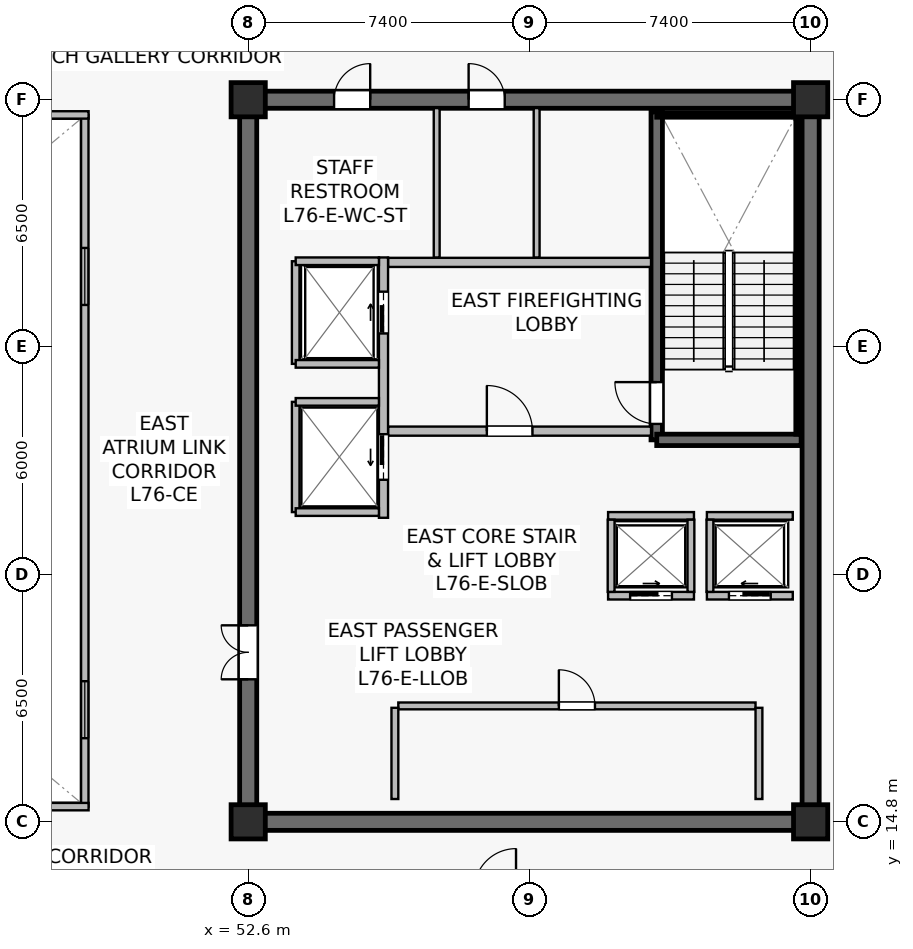
"""IFC4 building model, lengths in metres.
Left out: names, types, materials, properties, quantities, classifications, styles, units other than length and angle.
Written with IfcOpenShell. Run it as: python <this file> out.ifc"""

import sys

from ifc_helpers import new_model, si_unit, direction, frame, frame_2d, origin, origin_2d, place, context, subcontext, project, spatial, rectangle, extrude, source, transform, mapped, element, fill, save


model = new_model("IFC4")
c1 = context("Model", 3, precision=1e-05, world=origin(), true_north=direction((0.0, 1.0)))
c2 = subcontext(c1, "Body", "Model", "MODEL_VIEW")
j1 = project(units=[si_unit("LENGTHUNIT", "METRE"), si_unit("PLANEANGLEUNIT", "RADIAN")], contexts=[c1])
p1 = place(None, origin())
s1 = spatial("IfcSite", under=j1, at=p1, CompositionType="ELEMENT")
p2 = place(p1, origin())
s2 = spatial("IfcBuilding", under=s1, at=p2, CompositionType="ELEMENT")
p3 = place(p2, frame((0.0, 0.0, 318.6)))
s3 = spatial("IfcBuildingStorey", under=s2, at=p3, CompositionType="ELEMENT", Elevation=318.6)
p4 = place(p3, frame((52.375, 14.8, 0.0), z_axis=(0.0, 0.0, 1.0), x_axis=(1.0, 0.0, 0.0)))
e1 = element("IfcWall", 1, at=p4, inside=s3, PredefinedType="SHEAR", context=c2, shape_type="SweptSolid", body=[
    extrude(rectangle(XDim=15.25, YDim=0.45, at=frame_2d((7.625, 0.0))), origin(), (0.0, 0.0, 1.0), 3.9),
])
p5 = place(p3, frame((52.375, 33.8, 0.0), z_axis=(0.0, 0.0, 1.0), x_axis=(1.0, 0.0, 0.0)))
e2 = element("IfcWall", 2, at=p5, inside=s3, PredefinedType="SHEAR", context=c2, shape_type="SweptSolid", body=[
    extrude(rectangle(XDim=15.25, YDim=0.45, at=frame_2d((7.625, 0.0))), origin(), (0.0, 0.0, 1.0), 3.9),
])
p6 = place(p5, frame((6.025, 0.0, 0.0)))
e3 = element("IfcOpeningElement", 3, at=p6, cuts=e2, PredefinedType="OPENING", context=c2, shape_type="SweptSolid", body=[
    extrude(rectangle(XDim=0.95, YDim=2.15, at=frame_2d((0.475, 1.075))), frame((0.0, 0.235, 0.0), z_axis=(0.0, -1.0, 0.0), x_axis=(1.0, 0.0, 0.0)), (0.0, 0.0, 1.0), 0.47),
])
p7 = place(p5, frame((2.485, 0.0, 0.0)))
e4 = element("IfcOpeningElement", 4, at=p7, cuts=e2, PredefinedType="OPENING", context=c2, shape_type="SweptSolid", body=[
    extrude(rectangle(XDim=0.95, YDim=2.15, at=frame_2d((0.475, 1.075))), frame((0.0, 0.235, 0.0), z_axis=(0.0, -1.0, 0.0), x_axis=(1.0, 0.0, 0.0)), (0.0, 0.0, 1.0), 0.47),
])
p8 = place(p3, frame((52.6, 15.025, 0.0), z_axis=(0.0, 0.0, 1.0), x_axis=(0.0, 1.0, 0.0)))
e5 = element("IfcWall", 5, at=p8, inside=s3, PredefinedType="SHEAR", context=c2, shape_type="SweptSolid", body=[
    extrude(rectangle(XDim=18.55, YDim=0.45, at=frame_2d((9.275, 0.0))), origin(), (0.0, 0.0, 1.0), 3.9),
])
p9 = place(p8, frame((3.525, 0.0, 0.0)))
e6 = element("IfcOpeningElement", 6, at=p9, cuts=e5, PredefinedType="OPENING", context=c2, shape_type="SweptSolid", body=[
    extrude(rectangle(XDim=1.42, YDim=2.2, at=frame_2d((0.71, 1.1))), frame((0.0, 0.235, 0.0), z_axis=(0.0, -1.0, 0.0), x_axis=(1.0, 0.0, 0.0)), (0.0, 0.0, 1.0), 0.47),
])
p10 = place(p3, frame((67.4, 15.025, 0.0), z_axis=(0.0, 0.0, 1.0), x_axis=(0.0, 1.0, 0.0)))
e7 = element("IfcWall", 7, at=p10, inside=s3, PredefinedType="SHEAR", context=c2, shape_type="SweptSolid", body=[
    extrude(rectangle(XDim=18.55, YDim=0.45, at=frame_2d((9.275, 0.0))), origin(), (0.0, 0.0, 1.0), 3.9),
])
p11 = place(p3, frame((63.35, 24.85, 0.0), z_axis=(0.0, 0.0, 1.0), x_axis=(0.0, 1.0, 0.0)))
e8 = element("IfcWall", 8, at=p11, inside=s3, PredefinedType="SHEAR", context=c2, shape_type="SweptSolid", body=[
    extrude(rectangle(XDim=8.63, YDim=0.3, at=frame_2d((4.315, 0.0))), origin(), (0.0, 0.0, 1.0), 3.9),
])
p12 = place(p11, frame((0.42, 0.0, 0.0)))
e9 = element("IfcOpeningElement", 9, at=p12, cuts=e8, PredefinedType="OPENING", context=c2, shape_type="SweptSolid", body=[
    extrude(rectangle(XDim=1.1, YDim=2.15, at=frame_2d((0.55, 1.075))), frame((0.0, 0.16, 0.0), z_axis=(0.0, -1.0, 0.0), x_axis=(1.0, 0.0, 0.0)), (0.0, 0.0, 1.0), 0.32),
])
p13 = place(p3, frame((63.35, 24.85, 0.0), z_axis=(0.0, 0.0, 1.0), x_axis=(1.0, 0.0, 0.0)))
e10 = element("IfcWall", 10, at=p13, inside=s3, PredefinedType="SHEAR", context=c2, shape_type="SweptSolid", body=[
    extrude(rectangle(XDim=3.8, YDim=0.3, at=frame_2d((1.9, 0.0))), origin(), (0.0, 0.0, 1.0), 3.9),
])
p14 = place(p3, frame((63.35, 33.4, 0.0), z_axis=(0.0, 0.0, 1.0), x_axis=(1.0, 0.0, 0.0)))
e11 = element("IfcWall", 11, at=p14, inside=s3, PredefinedType="SOLIDWALL", context=c2, shape_type="SweptSolid", body=[
    extrude(rectangle(XDim=3.72, YDim=0.12, at=frame_2d((1.86, 0.0))), origin(), (0.0, 0.0, 1.0), 3.9),
])
p15 = place(p3, frame((67.07, 25.0, 0.0), z_axis=(0.0, 0.0, 1.0), x_axis=(0.0, 1.0, 0.0)))
e12 = element("IfcWall", 12, at=p15, inside=s3, PredefinedType="SOLIDWALL", context=c2, shape_type="SweptSolid", body=[
    extrude(rectangle(XDim=8.32, YDim=0.12, at=frame_2d((4.16, 0.0))), origin(), (0.0, 0.0, 1.0), 3.9),
])
m1 = source(origin(), c2, "Body", "SweptSolid", [
    extrude(rectangle(XDim=0.9, YDim=0.9, at=origin_2d()), origin(), (0.0, 0.0, 1.0), 4.2),
])
for number, where, z_axis, x_axis in (
    (13, (52.6, 14.8, 0.0), (0.0, 0.0, 1.0), (1.0, 0.0, 0.0)),
    (14, (67.4, 14.8, 0.0), (0.0, 0.0, 1.0), (1.0, 0.0, 0.0)),
    (15, (52.6, 33.8, 0.0), (0.0, 0.0, 1.0), (1.0, 0.0, 0.0)),
    (16, (67.4, 33.8, 0.0), (0.0, 0.0, 1.0), (1.0, 0.0, 0.0)),
):
    element("IfcColumn", number, at=place(p3, frame(where, z_axis=z_axis, x_axis=x_axis)), inside=s3, PredefinedType="COLUMN", context=c2, shape_type="MappedRepresentation", body=[
        mapped(m1, transform((0.0, 0.0, 0.0), scale=1.0)),
    ])
p16 = place(p3, frame((56.28, 25.08, 0.0), z_axis=(0.0, 0.0, 1.0), x_axis=(1.0, 0.0, 0.0)))
e17 = element("IfcWall", 17, at=p16, inside=s3, PredefinedType="SOLIDWALL", context=c2, shape_type="SweptSolid", body=[
    extrude(rectangle(XDim=6.92, YDim=0.24, at=frame_2d((3.46, 0.0))), origin(), (0.0, 0.0, 1.0), 3.297),
])
p17 = place(p16, frame((2.6, 0.0, 0.0)))
e18 = element("IfcOpeningElement", 18, at=p17, cuts=e17, PredefinedType="OPENING", context=c2, shape_type="SweptSolid", body=[
    extrude(rectangle(XDim=1.2, YDim=2.16, at=frame_2d((0.6, 1.08))), frame((0.0, 0.13, 0.0), z_axis=(0.0, -1.0, 0.0), x_axis=(1.0, 0.0, 0.0)), (0.0, 0.0, 1.0), 0.26),
])
p18 = place(p3, frame((56.28, 29.52, 0.0), z_axis=(0.0, 0.0, 1.0), x_axis=(1.0, 0.0, 0.0)))
e19 = element("IfcWall", 19, at=p18, inside=s3, PredefinedType="SOLIDWALL", context=c2, shape_type="SweptSolid", body=[
    extrude(rectangle(XDim=6.92, YDim=0.24, at=frame_2d((3.46, 0.0))), origin(), (0.0, 0.0, 1.0), 3.297),
])
p19 = place(p3, frame((56.16, 22.8, 0.0), z_axis=(0.0, 0.0, 1.0), x_axis=(0.0, 1.0, 0.0)))
e20 = element("IfcWall", 20, at=p19, inside=s3, PredefinedType="SOLIDWALL", context=c2, shape_type="SweptSolid", body=[
    extrude(rectangle(XDim=6.85, YDim=0.24, at=frame_2d((3.425, 0.0))), origin(), (0.0, 0.0, 1.0), 3.035),
])
p20 = place(p19, frame((4.85, 0.0, 0.0)))
e21 = element("IfcOpeningElement", 21, at=p20, cuts=e20, PredefinedType="OPENING", context=c2, shape_type="SweptSolid", body=[
    extrude(rectangle(XDim=1.1, YDim=2.22, at=frame_2d((0.55, 1.11))), frame((0.0, 0.13, 0.0), z_axis=(0.0, -1.0, 0.0), x_axis=(1.0, 0.0, 0.0)), (0.0, 0.0, 1.0), 0.26),
])
p21 = place(p19, frame((1.0, 0.0, 0.0)))
e22 = element("IfcOpeningElement", 22, at=p21, cuts=e20, PredefinedType="OPENING", context=c2, shape_type="SweptSolid", body=[
    extrude(rectangle(XDim=1.2, YDim=2.22, at=frame_2d((0.6, 1.11))), frame((0.0, 0.13, 0.0), z_axis=(0.0, -1.0, 0.0), x_axis=(1.0, 0.0, 0.0)), (0.0, 0.0, 1.0), 0.26),
])
p22 = place(p3, frame((64.67, 20.75, 0.0), z_axis=(0.0, 0.0, 1.0), x_axis=(1.0, 0.0, 0.0)))
e23 = element("IfcWall", 23, at=p22, inside=s3, PredefinedType="SOLIDWALL", context=c2, shape_type="SweptSolid", body=[
    extrude(rectangle(XDim=2.26, YDim=0.2, at=frame_2d((1.13, 0.0))), origin(), (0.0, 0.0, 1.0), 3.9),
])
p23 = place(p22, frame((0.58, 0.0, 0.0)))
e24 = element("IfcOpeningElement", 24, at=p23, cuts=e23, PredefinedType="OPENING", context=c2, shape_type="SweptSolid", body=[
    extrude(rectangle(XDim=1.1, YDim=2.22, at=frame_2d((0.55, 1.11))), frame((0.0, 0.11, 0.0), z_axis=(0.0, -1.0, 0.0), x_axis=(1.0, 0.0, 0.0)), (0.0, 0.0, 1.0), 0.22),
])
p24 = place(p3, frame((64.67, 22.85, 0.0), z_axis=(0.0, 0.0, 1.0), x_axis=(1.0, 0.0, 0.0)))
e25 = element("IfcWall", 25, at=p24, inside=s3, PredefinedType="SOLIDWALL", context=c2, shape_type="SweptSolid", body=[
    extrude(rectangle(XDim=2.26, YDim=0.2, at=frame_2d((1.13, 0.0))), origin(), (0.0, 0.0, 1.0), 3.9),
])
p25 = place(p3, frame((64.75, 20.85, 0.0), z_axis=(0.0, 0.0, 1.0), x_axis=(0.0, 1.0, 0.0)))
e26 = element("IfcWall", 26, at=p25, inside=s3, PredefinedType="SOLIDWALL", context=c2, shape_type="SweptSolid", body=[
    extrude(rectangle(XDim=1.9, YDim=0.18, at=frame_2d((0.95, 0.0))), origin(), (0.0, 0.0, 1.0), 3.9),
])
p26 = place(p3, frame((62.07, 20.75, 0.0), z_axis=(0.0, 0.0, 1.0), x_axis=(1.0, 0.0, 0.0)))
e27 = element("IfcWall", 27, at=p26, inside=s3, PredefinedType="SOLIDWALL", context=c2, shape_type="SweptSolid", body=[
    extrude(rectangle(XDim=2.26, YDim=0.2, at=frame_2d((1.13, 0.0))), origin(), (0.0, 0.0, 1.0), 3.9),
])
p27 = place(p26, frame((0.58, 0.0, 0.0)))
e28 = element("IfcOpeningElement", 28, at=p27, cuts=e27, PredefinedType="OPENING", context=c2, shape_type="SweptSolid", body=[
    extrude(rectangle(XDim=1.1, YDim=2.22, at=frame_2d((0.55, 1.11))), frame((0.0, 0.11, 0.0), z_axis=(0.0, -1.0, 0.0), x_axis=(1.0, 0.0, 0.0)), (0.0, 0.0, 1.0), 0.22),
])
p28 = place(p3, frame((62.07, 22.85, 0.0), z_axis=(0.0, 0.0, 1.0), x_axis=(1.0, 0.0, 0.0)))
e29 = element("IfcWall", 29, at=p28, inside=s3, PredefinedType="SOLIDWALL", context=c2, shape_type="SweptSolid", body=[
    extrude(rectangle(XDim=2.26, YDim=0.2, at=frame_2d((1.13, 0.0))), origin(), (0.0, 0.0, 1.0), 3.9),
])
for number, where, z_axis, x_axis in (
    (30, (62.15, 20.85, 0.0), (0.0, 0.0, 1.0), (0.0, 1.0, 0.0)),
    (31, (64.25, 20.85, 0.0), (0.0, 0.0, 1.0), (0.0, 1.0, 0.0)),
):
    element("IfcWall", number, at=place(p3, frame(where, z_axis=z_axis, x_axis=x_axis)), inside=s3, PredefinedType="SOLIDWALL", context=c2, shape_type="SweptSolid", body=[
        extrude(rectangle(XDim=1.9, YDim=0.18, at=frame_2d((0.95, 0.0))), origin(), (0.0, 0.0, 1.0), 3.9),
    ])
p29 = place(p3, frame((53.85, 26.85, 0.0), z_axis=(0.0, 0.0, 1.0), x_axis=(0.0, 1.0, 0.0)))
e32 = element("IfcWall", 32, at=p29, inside=s3, PredefinedType="SOLIDWALL", context=c2, shape_type="SweptSolid", body=[
    extrude(rectangle(XDim=2.7, YDim=0.2, at=frame_2d((1.35, 0.0))), origin(), (0.0, 0.0, 1.0), 3.9),
])
p30 = place(p3, frame((53.85, 29.55, 0.0), z_axis=(0.0, 0.0, 1.0), x_axis=(1.0, 0.0, 0.0)))
e33 = element("IfcWall", 33, at=p30, inside=s3, PredefinedType="SOLIDWALL", context=c2, shape_type="SweptSolid", body=[
    extrude(rectangle(XDim=2.19, YDim=0.2, at=frame_2d((1.095, 0.0))), origin(), (0.0, 0.0, 1.0), 3.9),
])
p31 = place(p3, frame((53.85, 26.85, 0.0), z_axis=(0.0, 0.0, 1.0), x_axis=(1.0, 0.0, 0.0)))
e34 = element("IfcWall", 34, at=p31, inside=s3, PredefinedType="SOLIDWALL", context=c2, shape_type="SweptSolid", body=[
    extrude(rectangle(XDim=2.19, YDim=0.2, at=frame_2d((1.095, 0.0))), origin(), (0.0, 0.0, 1.0), 3.297),
])
p32 = place(p3, frame((53.85, 22.95, 0.0), z_axis=(0.0, 0.0, 1.0), x_axis=(0.0, 1.0, 0.0)))
e35 = element("IfcWall", 35, at=p32, inside=s3, PredefinedType="SOLIDWALL", context=c2, shape_type="SweptSolid", body=[
    extrude(rectangle(XDim=2.9, YDim=0.2, at=frame_2d((1.45, 0.0))), origin(), (0.0, 0.0, 1.0), 3.035),
])
for number, where, z_axis, x_axis in (
    (36, (53.85, 25.85, 0.0), (0.0, 0.0, 1.0), (1.0, 0.0, 0.0)),
    (37, (53.85, 22.95, 0.0), (0.0, 0.0, 1.0), (1.0, 0.0, 0.0)),
):
    element("IfcWall", number, at=place(p3, frame(where, z_axis=z_axis, x_axis=x_axis)), inside=s3, PredefinedType="SOLIDWALL", context=c2, shape_type="SweptSolid", body=[
        extrude(rectangle(XDim=2.19, YDim=0.2, at=frame_2d((1.095, 0.0))), origin(), (0.0, 0.0, 1.0), 3.9),
    ])
p33 = place(p3, frame((56.55, 17.85, 0.0), z_axis=(0.0, 0.0, 1.0), x_axis=(1.0, 0.0, 0.0)))
e38 = element("IfcWall", 38, at=p33, inside=s3, PredefinedType="SOLIDWALL", context=c2, shape_type="SweptSolid", body=[
    extrude(rectangle(XDim=9.4, YDim=0.18, at=frame_2d((4.7, 0.0))), origin(), (0.0, 0.0, 1.0), 3.297),
])
p34 = place(p33, frame((4.225, 0.0, 0.0)))
e39 = element("IfcOpeningElement", 39, at=p34, cuts=e38, PredefinedType="OPENING", context=c2, shape_type="SweptSolid", body=[
    extrude(rectangle(XDim=0.95, YDim=2.15, at=frame_2d((0.475, 1.075))), frame((0.0, 0.1, 0.0), z_axis=(0.0, -1.0, 0.0), x_axis=(1.0, 0.0, 0.0)), (0.0, 0.0, 1.0), 0.2),
])
for number, where, z_axis, x_axis in (
    (40, (56.46, 15.4, 0.0), (0.0, 0.0, 1.0), (0.0, 1.0, 0.0)),
    (41, (66.04, 15.4, 0.0), (0.0, 0.0, 1.0), (0.0, 1.0, 0.0)),
):
    element("IfcWall", number, at=place(p3, frame(where, z_axis=z_axis, x_axis=x_axis)), inside=s3, PredefinedType="SOLIDWALL", context=c2, shape_type="SweptSolid", body=[
        extrude(rectangle(XDim=2.4, YDim=0.18, at=frame_2d((1.2, 0.0))), origin(), (0.0, 0.0, 1.0), 3.9),
    ])
p35 = place(p3, frame((60.19, 29.65, 0.0), z_axis=(0.0, 0.0, 1.0), x_axis=(0.0, 1.0, 0.0)))
e42 = element("IfcWall", 42, at=p35, inside=s3, PredefinedType="PLUMBINGWALL", context=c2, shape_type="SweptSolid", body=[
    extrude(rectangle(XDim=3.93, YDim=0.155, at=frame_2d((1.965, 0.0))), origin(), (0.0, 0.0, 1.0), 3.297),
])
p36 = place(p3, frame((57.56, 29.65, 0.0), z_axis=(0.0, 0.0, 1.0), x_axis=(0.0, 1.0, 0.0)))
e43 = element("IfcWall", 43, at=p36, inside=s3, PredefinedType="PLUMBINGWALL", context=c2, shape_type="SweptSolid", body=[
    extrude(rectangle(XDim=3.93, YDim=0.155, at=frame_2d((1.965, 0.0))), origin(), (0.0, 0.0, 1.0), 3.9),
])
p37 = place(p3, frame((48.3, 15.2, 0.0), z_axis=(0.0, 0.0, 1.0), x_axis=(0.0, 1.0, 0.0)))
e44 = element("IfcWall", 44, at=p37, inside=s3, PredefinedType="SOLIDWALL", context=c2, shape_type="SweptSolid", body=[
    extrude(rectangle(XDim=18.2, YDim=0.195, at=frame_2d((9.1, 0.0))), origin(), (0.0, 0.0, 1.0), 3.9),
])
p38 = place(p37, frame((1.8, 0.0, 0.9)))
e45 = element("IfcOpeningElement", 45, at=p38, cuts=e44, PredefinedType="OPENING", context=c2, shape_type="SweptSolid", body=[
    extrude(rectangle(XDim=1.5, YDim=1.4, at=frame_2d((0.75, 0.7))), frame((0.0, 0.107, 0.0), z_axis=(0.0, -1.0, 0.0), x_axis=(1.0, 0.0, 0.0)), (0.0, 0.0, 1.0), 0.215),
])
p39 = place(p37, frame((13.2, 0.0, 0.9)))
e46 = element("IfcOpeningElement", 46, at=p39, cuts=e44, PredefinedType="OPENING", context=c2, shape_type="SweptSolid", body=[
    extrude(rectangle(XDim=1.5, YDim=1.4, at=frame_2d((0.75, 0.7))), frame((0.0, 0.107, 0.0), z_axis=(0.0, -1.0, 0.0), x_axis=(1.0, 0.0, 0.0)), (0.0, 0.0, 1.0), 0.215),
])
for number, where, z_axis, x_axis in (
    (47, (26.4, 15.2, 0.0), (0.0, 0.0, 1.0), (1.0, 0.0, 0.0)),
    (48, (26.4, 33.4, 0.0), (0.0, 0.0, 1.0), (1.0, 0.0, 0.0)),
):
    element("IfcWall", number, at=place(p3, frame(where, z_axis=z_axis, x_axis=x_axis)), inside=s3, PredefinedType="SOLIDWALL", context=c2, shape_type="SweptSolid", body=[
        extrude(rectangle(XDim=22.0, YDim=0.195, at=frame_2d((11.0, 0.0))), origin(), (0.0, 0.0, 1.0), 3.9),
    ])
m2 = source(origin(), c2, "Body", "SweptSolid", [
    extrude(rectangle(XDim=1.5, YDim=1.4, at=frame_2d((0.75, 0.7))), frame((0.0, 0.03, 0.0), z_axis=(0.0, -1.0, 0.0), x_axis=(1.0, 0.0, 0.0)), (0.0, 0.0, 1.0), 0.06),
])
p40 = place(p38, origin())
e49 = element("IfcWindow", 49, at=p40, inside=s3, PartitioningType="SINGLE_PANEL", PredefinedType="WINDOW", context=c2, shape_type="MappedRepresentation", body=[
    mapped(m2, transform((0.0, 0.0, 0.0), scale=1.0)),
])
fill(e45, e49)
p41 = place(p39, origin())
e50 = element("IfcWindow", 50, at=p41, inside=s3, PartitioningType="SINGLE_PANEL", PredefinedType="WINDOW", context=c2, shape_type="MappedRepresentation", body=[
    mapped(m2, transform((0.0, 0.0, 0.0), scale=1.0)),
])
fill(e46, e50)
m3 = source(origin(), c2, "Body", "SweptSolid", [
    extrude(rectangle(XDim=1.1, YDim=2.15, at=frame_2d((0.55, 1.075))), frame((0.0, 0.025, 0.0), z_axis=(0.0, -1.0, 0.0), x_axis=(1.0, 0.0, 0.0)), (0.0, 0.0, 1.0), 0.05),
])
p42 = place(p12, origin())
e51 = element("IfcDoor", 51, at=p42, inside=s3, OperationType="SINGLE_SWING_RIGHT", PredefinedType="DOOR", context=c2, shape_type="MappedRepresentation", body=[
    mapped(m3, transform((0.0, 0.0, 0.0), scale=1.0)),
])
fill(e9, e51)
m4 = source(origin(), c2, "Body", "SweptSolid", [
    extrude(rectangle(XDim=1.2, YDim=2.16, at=frame_2d((0.6, 1.08))), frame((0.0, 0.025, 0.0), z_axis=(0.0, -1.0, 0.0), x_axis=(1.0, 0.0, 0.0)), (0.0, 0.0, 1.0), 0.05),
])
p43 = place(p17, origin())
e52 = element("IfcDoor", 52, at=p43, inside=s3, OperationType="SINGLE_SWING_LEFT", PredefinedType="DOOR", context=c2, shape_type="MappedRepresentation", body=[
    mapped(m4, transform((0.0, 0.0, 0.0), scale=1.0)),
])
fill(e18, e52)
m5 = source(origin(), c2, "Body", "SweptSolid", [
    extrude(rectangle(XDim=1.1, YDim=2.22, at=frame_2d((0.55, 1.11))), frame((0.0, 0.025, 0.0), z_axis=(0.0, -1.0, 0.0), x_axis=(1.0, 0.0, 0.0)), (0.0, 0.0, 1.0), 0.05),
])
p44 = place(p23, origin())
e53 = element("IfcDoor", 53, at=p44, inside=s3, OperationType="SLIDING_TO_LEFT", PredefinedType="USERDEFINED", context=c2, shape_type="MappedRepresentation", body=[
    mapped(m5, transform((0.0, 0.0, 0.0), scale=1.0)),
])
fill(e24, e53)
p45 = place(p27, origin())
e54 = element("IfcDoor", 54, at=p45, inside=s3, OperationType="SLIDING_TO_RIGHT", PredefinedType="USERDEFINED", context=c2, shape_type="MappedRepresentation", body=[
    mapped(m5, transform((0.0, 0.0, 0.0), scale=1.0)),
])
fill(e28, e54)
p46 = place(p20, origin())
e55 = element("IfcDoor", 55, at=p46, inside=s3, OperationType="SLIDING_TO_RIGHT", PredefinedType="USERDEFINED", context=c2, shape_type="MappedRepresentation", body=[
    mapped(m5, transform((0.0, 0.0, 0.0), scale=1.0)),
])
fill(e21, e55)
m6 = source(origin(), c2, "Body", "SweptSolid", [
    extrude(rectangle(XDim=1.2, YDim=2.22, at=frame_2d((0.6, 1.11))), frame((0.0, 0.025, 0.0), z_axis=(0.0, -1.0, 0.0), x_axis=(1.0, 0.0, 0.0)), (0.0, 0.0, 1.0), 0.05),
])
p47 = place(p21, origin())
e56 = element("IfcDoor", 56, at=p47, inside=s3, OperationType="SLIDING_TO_LEFT", PredefinedType="USERDEFINED", context=c2, shape_type="MappedRepresentation", body=[
    mapped(m6, transform((0.0, 0.0, 0.0), scale=1.0)),
])
fill(e22, e56)
m7 = source(origin(), c2, "Body", "SweptSolid", [
    extrude(rectangle(XDim=0.95, YDim=2.15, at=frame_2d((0.475, 1.075))), frame((0.0, 0.025, 0.0), z_axis=(0.0, -1.0, 0.0), x_axis=(1.0, 0.0, 0.0)), (0.0, 0.0, 1.0), 0.05),
])
p48 = place(p34, origin())
e57 = element("IfcDoor", 57, at=p48, inside=s3, OperationType="SINGLE_SWING_LEFT", PredefinedType="DOOR", context=c2, shape_type="MappedRepresentation", body=[
    mapped(m7, transform((0.0, 0.0, 0.0), scale=1.0)),
])
fill(e39, e57)
m8 = source(origin(), c2, "Body", "SweptSolid", [
    extrude(rectangle(XDim=1.42, YDim=2.2, at=frame_2d((0.71, 1.1))), frame((0.0, 0.025, 0.0), z_axis=(0.0, -1.0, 0.0), x_axis=(1.0, 0.0, 0.0)), (0.0, 0.0, 1.0), 0.05),
])
p49 = place(p9, origin())
e58 = element("IfcDoor", 58, at=p49, inside=s3, OperationType="DOUBLE_DOOR_SINGLE_SWING", PredefinedType="DOOR", context=c2, shape_type="MappedRepresentation", body=[
    mapped(m8, transform((0.0, 0.0, 0.0), scale=1.0)),
])
fill(e6, e58)
p50 = place(p6, origin())
e59 = element("IfcDoor", 59, at=p50, inside=s3, OperationType="SINGLE_SWING_LEFT", PredefinedType="DOOR", context=c2, shape_type="MappedRepresentation", body=[
    mapped(m7, transform((0.0, 0.0, 0.0), scale=1.0)),
])
fill(e3, e59)
p51 = place(p7, origin())
e60 = element("IfcDoor", 60, at=p51, inside=s3, OperationType="SINGLE_SWING_RIGHT", PredefinedType="DOOR", context=c2, shape_type="MappedRepresentation", body=[
    mapped(m7, transform((0.0, 0.0, 0.0), scale=1.0)),
])
fill(e4, e60)
save(model, sys.argv[1])
